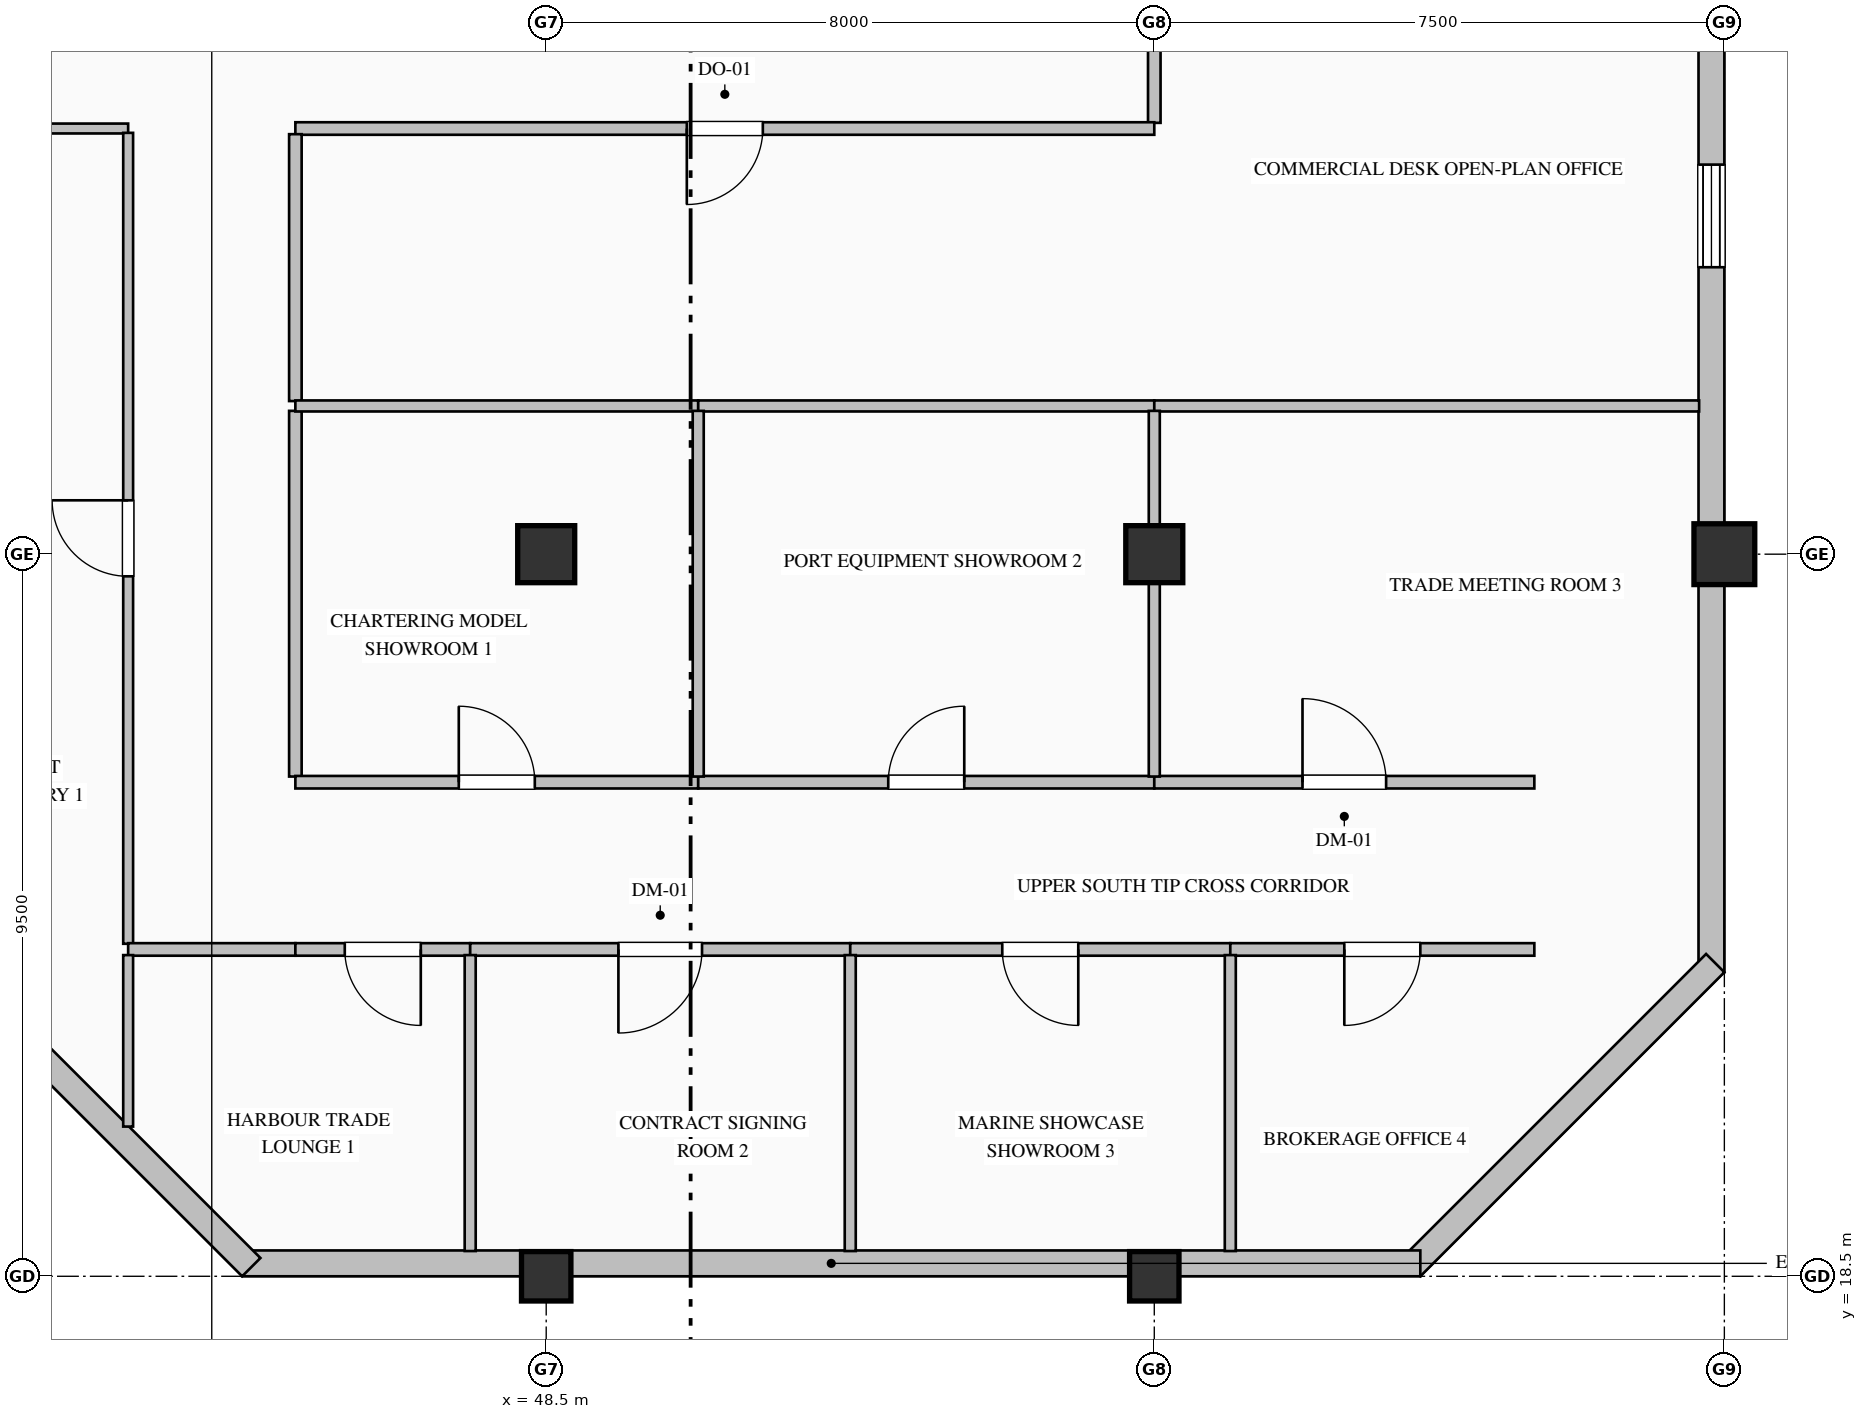
"""IFC4 building model, lengths in metres.
Left out: names, types, materials, properties, quantities, classifications, styles, units other than length and angle.
Written with IfcOpenShell. Run it as: python <this file> out.ifc"""

import sys

from ifc_helpers import new_model, si_unit, direction, frame, frame_2d, origin, origin_2d, place, context, subcontext, project, spatial, rectangle, hollow_rectangle, extrude, element, fill, save


model = new_model("IFC4")
c1 = context("Model", 3, precision=1e-05, world=origin(), true_north=direction((0.0, 1.0)))
c2 = subcontext(c1, "Body", "Model", "MODEL_VIEW")
j1 = project(units=[si_unit("LENGTHUNIT", "METRE"), si_unit("PLANEANGLEUNIT", "RADIAN")], contexts=[c1])
p1 = place(None, origin())
s1 = spatial("IfcSite", under=j1, at=p1, CompositionType="ELEMENT")
p2 = place(p1, origin())
s2 = spatial("IfcBuilding", under=s1, at=p2, CompositionType="ELEMENT")
p3 = place(p2, frame((0.0, 0.0, 355.2)))
s3 = spatial("IfcBuildingStorey", under=s2, at=p3, CompositionType="ELEMENT", Elevation=355.2)
p4 = place(p3, frame((48.5, 18.5, 0.0), z_axis=(0.0, 0.0, 1.0), x_axis=(1.0, 0.0, 0.0)))
e1 = element("IfcColumn", 1, at=p4, inside=s3, PredefinedType="COLUMN", context=c2, shape_type="SweptSolid", body=[
    extrude(hollow_rectangle(XDim=0.65, YDim=0.65, WallThickness=0.028, at=origin_2d()), origin(), (0.0, 0.0, 1.0), 4.0),
])
p5 = place(p3, frame((48.5, 28.0, 0.0), z_axis=(0.0, 0.0, 1.0), x_axis=(1.0, 0.0, 0.0)))
e2 = element("IfcColumn", 2, at=p5, inside=s3, PredefinedType="COLUMN", context=c2, shape_type="SweptSolid", body=[
    extrude(rectangle(XDim=0.75, YDim=0.75, at=origin_2d()), origin(), (0.0, 0.0, 1.0), 4.0),
])
p6 = place(p3, frame((56.5, 18.5, 0.0), z_axis=(0.0, 0.0, 1.0), x_axis=(1.0, 0.0, 0.0)))
e3 = element("IfcColumn", 3, at=p6, inside=s3, PredefinedType="COLUMN", context=c2, shape_type="SweptSolid", body=[
    extrude(hollow_rectangle(XDim=0.65, YDim=0.65, WallThickness=0.028, at=origin_2d()), origin(), (0.0, 0.0, 1.0), 4.0),
])
p7 = place(p3, frame((56.5, 28.0, 0.0), z_axis=(0.0, 0.0, 1.0), x_axis=(1.0, 0.0, 0.0)))
e4 = element("IfcColumn", 4, at=p7, inside=s3, PredefinedType="COLUMN", context=c2, shape_type="SweptSolid", body=[
    extrude(rectangle(XDim=0.75, YDim=0.75, at=origin_2d()), origin(), (0.0, 0.0, 1.0), 4.0),
])
p8 = place(p3, frame((64.0, 28.0, 0.0), z_axis=(0.0, 0.0, 1.0), x_axis=(1.0, 0.0, 0.0)))
e5 = element("IfcColumn", 5, at=p8, inside=s3, PredefinedType="COLUMN", context=c2, shape_type="SweptSolid", body=[
    extrude(hollow_rectangle(XDim=0.8, YDim=0.8, WallThickness=0.032, at=origin_2d()), origin(), (0.0, 0.0, 1.0), 4.0),
])
p9 = place(p3, frame((63.83, 36.05, 0.0), z_axis=(0.0, 0.0, 1.0), x_axis=(0.0, -1.0, 0.0)))
e6 = element("IfcWall", 6, at=p9, inside=s3, PredefinedType="SOLIDWALL", context=c2, shape_type="SweptSolid", body=[
    extrude(rectangle(XDim=13.55, YDim=0.34, at=frame_2d((6.775, 0.0))), origin(), (0.0, 0.0, 1.0), 3.335),
])
p10 = place(p9, frame((2.925, 0.0, 0.9)))
e7 = element("IfcOpeningElement", 7, at=p10, cuts=e6, PredefinedType="OPENING", context=c2, shape_type="SweptSolid", body=[
    extrude(rectangle(XDim=1.35, YDim=1.85, at=frame_2d((0.675, 0.925))), frame((0.0, 0.18, 0.0), z_axis=(0.0, -1.0, 0.0), x_axis=(1.0, 0.0, 0.0)), (0.0, 0.0, 1.0), 0.36),
])
p11 = place(p3, frame((63.88, 22.62, 0.0), z_axis=(0.0, 0.0, 1.0), x_axis=(-0.707106781187, -0.707106781187, 0.0)))
e8 = element("IfcWall", 8, at=p11, inside=s3, PredefinedType="SOLIDWALL", context=c2, shape_type="SweptSolid", body=[
    extrude(rectangle(XDim=5.657, YDim=0.34, at=frame_2d((2.828, 0.0))), origin(), (0.0, 0.0, 1.0), 3.785),
])
p12 = place(p3, frame((60.0, 18.67, 0.0), z_axis=(0.0, 0.0, 1.0), x_axis=(-1.0, 0.0, 0.0)))
e9 = element("IfcWall", 9, at=p12, inside=s3, PredefinedType="SOLIDWALL", context=c2, shape_type="SweptSolid", body=[
    extrude(rectangle(XDim=15.5, YDim=0.34, at=frame_2d((7.75, 0.0))), origin(), (0.0, 0.0, 1.0), 3.335),
])
p13 = place(p3, frame((44.62, 18.62, 0.0), z_axis=(0.0, 0.0, 1.0), x_axis=(-0.707106781187, 0.707106781187, 0.0)))
e10 = element("IfcWall", 10, at=p13, inside=s3, PredefinedType="SOLIDWALL", context=c2, shape_type="SweptSolid", body=[
    extrude(rectangle(XDim=5.657, YDim=0.34, at=frame_2d((2.828, 0.0))), origin(), (0.0, 0.0, 1.0), 3.785),
])
p14 = place(p3, frame((56.5, 36.0, 0.0), z_axis=(0.0, 0.0, 1.0), x_axis=(0.0, -1.0, 0.0)))
e11 = element("IfcWall", 11, at=p14, inside=s3, PredefinedType="PARTITIONING", context=c2, shape_type="SweptSolid", body=[
    extrude(rectangle(XDim=2.325, YDim=0.165, at=frame_2d((1.163, 0.0))), origin(), (0.0, 0.0, 1.0), 3.177),
])
p15 = place(p3, frame((56.5, 33.6, 0.0), z_axis=(0.0, 0.0, 1.0), x_axis=(-1.0, 0.0, 0.0)))
e12 = element("IfcWall", 12, at=p15, inside=s3, PredefinedType="PARTITIONING", context=c2, shape_type="SweptSolid", body=[
    extrude(rectangle(XDim=11.3, YDim=0.165, at=frame_2d((5.65, 0.0))), origin(), (0.0, 0.0, 1.0), 3.785),
])
p16 = place(p15, frame((5.15, 0.0, 0.0)))
e13 = element("IfcOpeningElement", 13, at=p16, cuts=e12, PredefinedType="OPENING", context=c2, shape_type="SweptSolid", body=[
    extrude(rectangle(XDim=1.0, YDim=2.15, at=frame_2d((0.5, 1.075))), frame((0.0, 0.093, 0.0), z_axis=(0.0, -1.0, 0.0), x_axis=(1.0, 0.0, 0.0)), (0.0, 0.0, 1.0), 0.185),
])
p17 = place(p3, frame((43.0, 33.6, 0.0), z_axis=(0.0, 0.0, 1.0), x_axis=(-1.0, 0.0, 0.0)))
e14 = element("IfcWall", 14, at=p17, inside=s3, PredefinedType="PARTITIONING", context=c2, shape_type="SweptSolid", body=[
    extrude(rectangle(XDim=2.5, YDim=0.13, at=frame_2d((1.25, 0.0))), origin(), (0.0, 0.0, 1.0), 3.785),
])
p18 = place(p3, frame((45.2, 33.525, 0.0), z_axis=(0.0, 0.0, 1.0), x_axis=(0.0, -1.0, 0.0)))
e15 = element("IfcWall", 15, at=p18, inside=s3, PredefinedType="PARTITIONING", context=c2, shape_type="SweptSolid", body=[
    extrude(rectangle(XDim=3.511, YDim=0.165, at=frame_2d((1.755, 0.0))), origin(), (0.0, 0.0, 1.0), 3.785),
])
p19 = place(p3, frame((45.2, 29.885, 0.0), z_axis=(0.0, 0.0, 1.0), x_axis=(0.0, -1.0, 0.0)))
e16 = element("IfcWall", 16, at=p19, inside=s3, PredefinedType="PARTITIONING", context=c2, shape_type="SweptSolid", body=[
    extrude(rectangle(XDim=4.811, YDim=0.165, at=frame_2d((2.406, 0.0))), origin(), (0.0, 0.0, 1.0), 3.785),
])
p20 = place(p3, frame((43.0, 22.875, 0.0), z_axis=(0.0, 0.0, 1.0), x_axis=(0.0, 1.0, 0.0)))
e17 = element("IfcWall", 17, at=p20, inside=s3, PredefinedType="PARTITIONING", context=c2, shape_type="SweptSolid", body=[
    extrude(rectangle(XDim=10.668, YDim=0.13, at=frame_2d((5.334, 0.0))), origin(), (0.0, 0.0, 1.0), 3.785),
])
p21 = place(p20, frame((4.834, 0.0, 0.0)))
e18 = element("IfcOpeningElement", 18, at=p21, cuts=e17, PredefinedType="OPENING", context=c2, shape_type="SweptSolid", body=[
    extrude(rectangle(XDim=1.0, YDim=2.15, at=frame_2d((0.5, 1.075))), frame((0.0, 0.075, 0.0), z_axis=(0.0, -1.0, 0.0), x_axis=(1.0, 0.0, 0.0)), (0.0, 0.0, 1.0), 0.15),
])
p22 = place(p3, frame((45.2, 22.8, 0.0), z_axis=(0.0, 0.0, 1.0), x_axis=(-1.0, 0.0, 0.0)))
e19 = element("IfcWall", 19, at=p22, inside=s3, PredefinedType="PARTITIONING", context=c2, shape_type="SweptSolid", body=[
    extrude(rectangle(XDim=2.2, YDim=0.165, at=frame_2d((1.1, 0.0))), origin(), (0.0, 0.0, 1.0), 3.785),
])
p23 = place(p3, frame((45.2, 25.0, 0.0), z_axis=(0.0, 0.0, 1.0), x_axis=(1.0, 0.0, 0.0)))
e20 = element("IfcWall", 20, at=p23, inside=s3, PredefinedType="PARTITIONING", context=c2, shape_type="SweptSolid", body=[
    extrude(rectangle(XDim=5.3, YDim=0.165, at=frame_2d((2.65, 0.0))), origin(), (0.0, 0.0, 1.0), 3.785),
])
p24 = place(p23, frame((2.15, 0.0, 0.0)))
e21 = element("IfcOpeningElement", 21, at=p24, cuts=e20, PredefinedType="OPENING", context=c2, shape_type="SweptSolid", body=[
    extrude(rectangle(XDim=1.0, YDim=2.15, at=frame_2d((0.5, 1.075))), frame((0.0, 0.093, 0.0), z_axis=(0.0, -1.0, 0.0), x_axis=(1.0, 0.0, 0.0)), (0.0, 0.0, 1.0), 0.185),
])
p25 = place(p3, frame((50.5, 25.0, 0.0), z_axis=(0.0, 0.0, 1.0), x_axis=(1.0, 0.0, 0.0)))
e22 = element("IfcWall", 22, at=p25, inside=s3, PredefinedType="PARTITIONING", context=c2, shape_type="SweptSolid", body=[
    extrude(rectangle(XDim=6.0, YDim=0.165, at=frame_2d((3.0, 0.0))), origin(), (0.0, 0.0, 1.0), 3.785),
])
p26 = place(p25, frame((2.5, 0.0, 0.0)))
e23 = element("IfcOpeningElement", 23, at=p26, cuts=e22, PredefinedType="OPENING", context=c2, shape_type="SweptSolid", body=[
    extrude(rectangle(XDim=1.0, YDim=2.15, at=frame_2d((0.5, 1.075))), frame((0.0, 0.093, 0.0), z_axis=(0.0, -1.0, 0.0), x_axis=(1.0, 0.0, 0.0)), (0.0, 0.0, 1.0), 0.185),
])
p27 = place(p3, frame((56.5, 25.0, 0.0), z_axis=(0.0, 0.0, 1.0), x_axis=(1.0, 0.0, 0.0)))
e24 = element("IfcWall", 24, at=p27, inside=s3, PredefinedType="PARTITIONING", context=c2, shape_type="SweptSolid", body=[
    extrude(rectangle(XDim=5.0, YDim=0.165, at=frame_2d((2.5, 0.0))), origin(), (0.0, 0.0, 1.0), 3.785),
])
p28 = place(p27, frame((1.95, 0.0, 0.0)))
e25 = element("IfcOpeningElement", 25, at=p28, cuts=e24, PredefinedType="OPENING", context=c2, shape_type="SweptSolid", body=[
    extrude(rectangle(XDim=1.1, YDim=2.2, at=frame_2d((0.55, 1.1))), frame((0.0, 0.093, 0.0), z_axis=(0.0, -1.0, 0.0), x_axis=(1.0, 0.0, 0.0)), (0.0, 0.0, 1.0), 0.185),
])
p29 = place(p3, frame((47.5, 22.8, 0.0), z_axis=(0.0, 0.0, 1.0), x_axis=(-1.0, 0.0, 0.0)))
e26 = element("IfcWall", 26, at=p29, inside=s3, PredefinedType="PARTITIONING", context=c2, shape_type="SweptSolid", body=[
    extrude(rectangle(XDim=2.3, YDim=0.165, at=frame_2d((1.15, 0.0))), origin(), (0.0, 0.0, 1.0), 3.785),
])
p30 = place(p29, frame((0.65, 0.0, 0.0)))
e27 = element("IfcOpeningElement", 27, at=p30, cuts=e26, PredefinedType="OPENING", context=c2, shape_type="SweptSolid", body=[
    extrude(rectangle(XDim=1.0, YDim=2.15, at=frame_2d((0.5, 1.075))), frame((0.0, 0.093, 0.0), z_axis=(0.0, -1.0, 0.0), x_axis=(1.0, 0.0, 0.0)), (0.0, 0.0, 1.0), 0.185),
])
p31 = place(p3, frame((52.5, 22.8, 0.0), z_axis=(0.0, 0.0, 1.0), x_axis=(-1.0, 0.0, 0.0)))
e28 = element("IfcWall", 28, at=p31, inside=s3, PredefinedType="PARTITIONING", context=c2, shape_type="SweptSolid", body=[
    extrude(rectangle(XDim=5.0, YDim=0.165, at=frame_2d((2.5, 0.0))), origin(), (0.0, 0.0, 1.0), 3.785),
])
p32 = place(p31, frame((1.95, 0.0, 0.0)))
e29 = element("IfcOpeningElement", 29, at=p32, cuts=e28, PredefinedType="OPENING", context=c2, shape_type="SweptSolid", body=[
    extrude(rectangle(XDim=1.1, YDim=2.2, at=frame_2d((0.55, 1.1))), frame((0.0, 0.093, 0.0), z_axis=(0.0, -1.0, 0.0), x_axis=(1.0, 0.0, 0.0)), (0.0, 0.0, 1.0), 0.185),
])
p33 = place(p3, frame((57.5, 22.8, 0.0), z_axis=(0.0, 0.0, 1.0), x_axis=(-1.0, 0.0, 0.0)))
e30 = element("IfcWall", 30, at=p33, inside=s3, PredefinedType="PARTITIONING", context=c2, shape_type="SweptSolid", body=[
    extrude(rectangle(XDim=5.0, YDim=0.165, at=frame_2d((2.5, 0.0))), origin(), (0.0, 0.0, 1.0), 3.785),
])
p34 = place(p33, frame((2.0, 0.0, 0.0)))
e31 = element("IfcOpeningElement", 31, at=p34, cuts=e30, PredefinedType="OPENING", context=c2, shape_type="SweptSolid", body=[
    extrude(rectangle(XDim=1.0, YDim=2.15, at=frame_2d((0.5, 1.075))), frame((0.0, 0.093, 0.0), z_axis=(0.0, -1.0, 0.0), x_axis=(1.0, 0.0, 0.0)), (0.0, 0.0, 1.0), 0.185),
])
p35 = place(p3, frame((61.5, 22.8, 0.0), z_axis=(0.0, 0.0, 1.0), x_axis=(-1.0, 0.0, 0.0)))
e32 = element("IfcWall", 32, at=p35, inside=s3, PredefinedType="PARTITIONING", context=c2, shape_type="SweptSolid", body=[
    extrude(rectangle(XDim=4.0, YDim=0.165, at=frame_2d((2.0, 0.0))), origin(), (0.0, 0.0, 1.0), 3.785),
])
p36 = place(p35, frame((1.5, 0.0, 0.0)))
e33 = element("IfcOpeningElement", 33, at=p36, cuts=e32, PredefinedType="OPENING", context=c2, shape_type="SweptSolid", body=[
    extrude(rectangle(XDim=1.0, YDim=2.15, at=frame_2d((0.5, 1.075))), frame((0.0, 0.093, 0.0), z_axis=(0.0, -1.0, 0.0), x_axis=(1.0, 0.0, 0.0)), (0.0, 0.0, 1.0), 0.185),
])
p37 = place(p3, frame((50.5, 29.95, 0.0), z_axis=(0.0, 0.0, 1.0), x_axis=(-1.0, 0.0, 0.0)))
e34 = element("IfcWall", 34, at=p37, inside=s3, PredefinedType="PARTITIONING", context=c2, shape_type="SweptSolid", body=[
    extrude(rectangle(XDim=5.3, YDim=0.145, at=frame_2d((2.65, 0.0))), origin(), (0.0, 0.0, 1.0), 3.785),
])
p38 = place(p3, frame((56.5, 29.95, 0.0), z_axis=(0.0, 0.0, 1.0), x_axis=(-1.0, 0.0, 0.0)))
e35 = element("IfcWall", 35, at=p38, inside=s3, PredefinedType="PARTITIONING", context=c2, shape_type="SweptSolid", body=[
    extrude(rectangle(XDim=6.0, YDim=0.145, at=frame_2d((3.0, 0.0))), origin(), (0.0, 0.0, 1.0), 3.785),
])
p39 = place(p3, frame((63.668, 29.95, 0.0), z_axis=(0.0, 0.0, 1.0), x_axis=(-1.0, 0.0, 0.0)))
e36 = element("IfcWall", 36, at=p39, inside=s3, PredefinedType="PARTITIONING", context=c2, shape_type="SweptSolid", body=[
    extrude(rectangle(XDim=7.168, YDim=0.145, at=frame_2d((3.584, 0.0))), origin(), (0.0, 0.0, 1.0), 3.785),
])
p40 = place(p3, frame((50.5, 29.885, 0.0), z_axis=(0.0, 0.0, 1.0), x_axis=(0.0, -1.0, 0.0)))
e37 = element("IfcWall", 37, at=p40, inside=s3, PredefinedType="PARTITIONING", context=c2, shape_type="SweptSolid", body=[
    extrude(rectangle(XDim=4.811, YDim=0.145, at=frame_2d((2.406, 0.0))), origin(), (0.0, 0.0, 1.0), 3.785),
])
p41 = place(p3, frame((56.5, 29.885, 0.0), z_axis=(0.0, 0.0, 1.0), x_axis=(0.0, -1.0, 0.0)))
e38 = element("IfcWall", 38, at=p41, inside=s3, PredefinedType="PARTITIONING", context=c2, shape_type="SweptSolid", body=[
    extrude(rectangle(XDim=4.811, YDim=0.145, at=frame_2d((2.406, 0.0))), origin(), (0.0, 0.0, 1.0), 2.977),
])
p42 = place(p3, frame((43.0, 22.726, 0.0), z_axis=(0.0, 0.0, 1.0), x_axis=(0.0, -1.0, 0.0)))
e39 = element("IfcWall", 39, at=p42, inside=s3, PredefinedType="PARTITIONING", context=c2, shape_type="SweptSolid", body=[
    extrude(rectangle(XDim=2.256, YDim=0.13, at=frame_2d((1.128, 0.0))), origin(), (0.0, 0.0, 1.0), 3.785),
])
for number, where, z_axis, x_axis in (
    (40, (47.5, 22.726, 0.0), (0.0, 0.0, 1.0), (0.0, -1.0, 0.0)),
    (41, (52.5, 22.726, 0.0), (0.0, 0.0, 1.0), (0.0, -1.0, 0.0)),
    (42, (57.5, 22.726, 0.0), (0.0, 0.0, 1.0), (0.0, -1.0, 0.0)),
):
    element("IfcWall", number, at=place(p3, frame(where, z_axis=z_axis, x_axis=x_axis)), inside=s3, PredefinedType="PARTITIONING", context=c2, shape_type="SweptSolid", body=[
        extrude(rectangle(XDim=3.894, YDim=0.145, at=frame_2d((1.947, 0.0))), origin(), (0.0, 0.0, 1.0), 3.785),
    ])
p43 = place(p10, origin())
e43 = element("IfcWindow", 43, at=p43, inside=s3, PartitioningType="DOUBLE_PANEL_VERTICAL", PredefinedType="WINDOW", context=c2, shape_type="SweptSolid", body=[
    extrude(rectangle(XDim=1.35, YDim=1.85, at=frame_2d((0.675, 0.925))), frame((0.0, 0.15, 0.0), z_axis=(0.0, -1.0, 0.0), x_axis=(1.0, 0.0, 0.0)), (0.0, 0.0, 1.0), 0.06),
])
fill(e7, e43)
p44 = place(p16, origin())
e44 = element("IfcDoor", 44, at=p44, inside=s3, OperationType="SINGLE_SWING_RIGHT", PredefinedType="DOOR", context=c2, shape_type="SweptSolid", body=[
    extrude(rectangle(XDim=1.0, YDim=2.15, at=frame_2d((0.5, 1.075))), frame((0.0, 0.025, 0.0), z_axis=(0.0, -1.0, 0.0), x_axis=(1.0, 0.0, 0.0)), (0.0, 0.0, 1.0), 0.05),
])
fill(e13, e44)
p45 = place(p24, origin())
e45 = element("IfcDoor", 45, at=p45, inside=s3, OperationType="SINGLE_SWING_LEFT", PredefinedType="DOOR", context=c2, shape_type="SweptSolid", body=[
    extrude(rectangle(XDim=1.0, YDim=2.15, at=frame_2d((0.5, 1.075))), frame((0.0, 0.025, 0.0), z_axis=(0.0, -1.0, 0.0), x_axis=(1.0, 0.0, 0.0)), (0.0, 0.0, 1.0), 0.05),
])
fill(e21, e45)
p46 = place(p26, origin())
e46 = element("IfcDoor", 46, at=p46, inside=s3, OperationType="SINGLE_SWING_RIGHT", PredefinedType="DOOR", context=c2, shape_type="SweptSolid", body=[
    extrude(rectangle(XDim=1.0, YDim=2.15, at=frame_2d((0.5, 1.075))), frame((0.0, 0.025, 0.0), z_axis=(0.0, -1.0, 0.0), x_axis=(1.0, 0.0, 0.0)), (0.0, 0.0, 1.0), 0.05),
])
fill(e23, e46)
p47 = place(p28, origin())
e47 = element("IfcDoor", 47, at=p47, inside=s3, OperationType="SINGLE_SWING_LEFT", PredefinedType="DOOR", context=c2, shape_type="SweptSolid", body=[
    extrude(rectangle(XDim=1.1, YDim=2.2, at=frame_2d((0.55, 1.1))), frame((0.0, 0.025, 0.0), z_axis=(0.0, -1.0, 0.0), x_axis=(1.0, 0.0, 0.0)), (0.0, 0.0, 1.0), 0.05),
])
fill(e25, e47)
p48 = place(p21, origin())
e48 = element("IfcDoor", 48, at=p48, inside=s3, OperationType="SINGLE_SWING_RIGHT", PredefinedType="DOOR", context=c2, shape_type="SweptSolid", body=[
    extrude(rectangle(XDim=1.0, YDim=2.15, at=frame_2d((0.5, 1.075))), frame((0.0, 0.025, 0.0), z_axis=(0.0, -1.0, 0.0), x_axis=(1.0, 0.0, 0.0)), (0.0, 0.0, 1.0), 0.05),
])
fill(e18, e48)
p49 = place(p30, origin())
e49 = element("IfcDoor", 49, at=p49, inside=s3, OperationType="SINGLE_SWING_LEFT", PredefinedType="DOOR", context=c2, shape_type="SweptSolid", body=[
    extrude(rectangle(XDim=1.0, YDim=2.15, at=frame_2d((0.5, 1.075))), frame((0.0, 0.025, 0.0), z_axis=(0.0, -1.0, 0.0), x_axis=(1.0, 0.0, 0.0)), (0.0, 0.0, 1.0), 0.05),
])
fill(e27, e49)
p50 = place(p32, origin())
e50 = element("IfcDoor", 50, at=p50, inside=s3, OperationType="SINGLE_SWING_RIGHT", PredefinedType="DOOR", context=c2, shape_type="SweptSolid", body=[
    extrude(rectangle(XDim=1.1, YDim=2.2, at=frame_2d((0.55, 1.1))), frame((0.0, 0.025, 0.0), z_axis=(0.0, -1.0, 0.0), x_axis=(1.0, 0.0, 0.0)), (0.0, 0.0, 1.0), 0.05),
])
fill(e29, e50)
p51 = place(p34, origin())
e51 = element("IfcDoor", 51, at=p51, inside=s3, OperationType="SINGLE_SWING_LEFT", PredefinedType="DOOR", context=c2, shape_type="SweptSolid", body=[
    extrude(rectangle(XDim=1.0, YDim=2.15, at=frame_2d((0.5, 1.075))), frame((0.0, 0.025, 0.0), z_axis=(0.0, -1.0, 0.0), x_axis=(1.0, 0.0, 0.0)), (0.0, 0.0, 1.0), 0.05),
])
fill(e31, e51)
p52 = place(p36, origin())
e52 = element("IfcDoor", 52, at=p52, inside=s3, OperationType="SINGLE_SWING_RIGHT", PredefinedType="DOOR", context=c2, shape_type="SweptSolid", body=[
    extrude(rectangle(XDim=1.0, YDim=2.15, at=frame_2d((0.5, 1.075))), frame((0.0, 0.025, 0.0), z_axis=(0.0, -1.0, 0.0), x_axis=(1.0, 0.0, 0.0)), (0.0, 0.0, 1.0), 0.05),
])
fill(e33, e52)
save(model, sys.argv[1])
